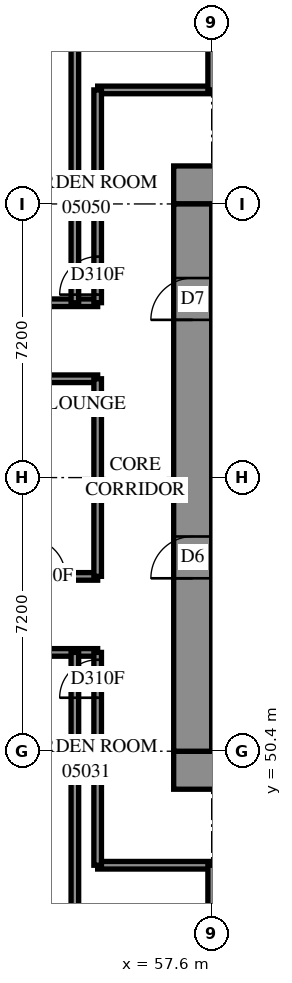
"""IFC4 building model, lengths in metres.
Left out: names, types, materials, properties, quantities, classifications, styles, units other than length and angle.
Written with IfcOpenShell. Run it as: python <this file> out.ifc"""

import sys

from ifc_helpers import new_model, si_unit, direction, frame, frame_2d, origin, place, context, subcontext, project, spatial, rectangle, extrude, element, fill, save


model = new_model("IFC4")
c1 = context("Model", 3, precision=1e-05, world=origin(), true_north=direction((0.0, 1.0)))
c2 = subcontext(c1, "Body", "Model", "MODEL_VIEW")
j1 = project(units=[si_unit("LENGTHUNIT", "METRE"), si_unit("PLANEANGLEUNIT", "RADIAN")], contexts=[c1])
p1 = place(None, origin())
s1 = spatial("IfcSite", under=j1, at=p1, CompositionType="ELEMENT")
p2 = place(p1, origin())
s2 = spatial("IfcBuilding", under=s1, at=p2, CompositionType="ELEMENT")
p3 = place(p2, frame((0.0, 0.0, 22.8)))
s3 = spatial("IfcBuildingStorey", under=s2, at=p3, CompositionType="ELEMENT", Elevation=22.8)
p4 = place(p3, frame((56.6, 49.9, -0.4), z_axis=(0.0, 0.0, 1.0), x_axis=(1.0, 0.0, 0.0)))
e1 = element("IfcWall", 1, at=p4, inside=s3, PredefinedType="SHEAR", context=c2, shape_type="SweptSolid", body=[
    extrude(rectangle(XDim=16.4, YDim=1.0, at=frame_2d((8.2, 0.0))), origin(), (0.0, 0.0, 1.0), 3.6),
])
p5 = place(p3, frame((56.6, 65.3, -0.4), z_axis=(0.0, 0.0, 1.0), x_axis=(1.0, 0.0, 0.0)))
e2 = element("IfcWall", 2, at=p5, inside=s3, PredefinedType="SHEAR", context=c2, shape_type="SweptSolid", body=[
    extrude(rectangle(XDim=16.4, YDim=1.0, at=frame_2d((8.2, 0.0))), origin(), (0.0, 0.0, 1.0), 3.6),
])
p6 = place(p5, frame((11.0, 0.0, 0.4)))
e3 = element("IfcOpeningElement", 3, at=p6, cuts=e2, PredefinedType="OPENING", context=c2, shape_type="SweptSolid", body=[
    extrude(rectangle(XDim=0.8, YDim=2.1, at=frame_2d((0.4, 1.05))), frame((0.0, 0.51, 0.0), z_axis=(0.0, -1.0, 0.0), x_axis=(1.0, 0.0, 0.0)), (0.0, 0.0, 1.0), 1.02),
])
p7 = place(p3, frame((57.1, 50.4, -0.4), z_axis=(0.0, 0.0, 1.0), x_axis=(0.0, 1.0, 0.0)))
e4 = element("IfcWall", 4, at=p7, inside=s3, PredefinedType="SHEAR", context=c2, shape_type="SweptSolid", body=[
    extrude(rectangle(XDim=14.4, YDim=1.0, at=frame_2d((7.2, 0.0))), origin(), (0.0, 0.0, 1.0), 3.6),
])
p8 = place(p7, frame((4.55, 0.0, 0.4)))
e5 = element("IfcOpeningElement", 5, at=p8, cuts=e4, PredefinedType="OPENING", context=c2, shape_type="SweptSolid", body=[
    extrude(rectangle(XDim=1.1, YDim=2.1, at=frame_2d((0.55, 1.05))), frame((0.0, 0.51, 0.0), z_axis=(0.0, -1.0, 0.0), x_axis=(1.0, 0.0, 0.0)), (0.0, 0.0, 1.0), 1.02),
])
p9 = place(p7, frame((11.35, 0.0, 0.4)))
e6 = element("IfcOpeningElement", 6, at=p9, cuts=e4, PredefinedType="OPENING", context=c2, shape_type="SweptSolid", body=[
    extrude(rectangle(XDim=1.1, YDim=2.1, at=frame_2d((0.55, 1.05))), frame((0.0, 0.51, 0.0), z_axis=(0.0, -1.0, 0.0), x_axis=(1.0, 0.0, 0.0)), (0.0, 0.0, 1.0), 1.02),
])
p10 = place(p3, frame((0.0, 55.0, 0.0), z_axis=(0.0, 0.0, 1.0), x_axis=(1.0, 0.0, 0.0)))
e7 = element("IfcWall", 7, at=p10, inside=s3, PredefinedType="PARTITIONING", context=c2, shape_type="SweptSolid", body=[
    extrude(rectangle(XDim=54.6, YDim=0.2, at=frame_2d((27.3, 0.0))), origin(), (0.0, 0.0, 1.0), 3.9),
])
p11 = place(p10, frame((8.689, 0.0, 0.0)))
e8 = element("IfcOpeningElement", 8, at=p11, cuts=e7, PredefinedType="OPENING", context=c2, shape_type="SweptSolid", body=[
    extrude(rectangle(XDim=1.0, YDim=2.1, at=frame_2d((0.5, 1.05))), frame((0.0, 0.11, 0.0), z_axis=(0.0, -1.0, 0.0), x_axis=(1.0, 0.0, 0.0)), (0.0, 0.0, 1.0), 0.22),
])
p12 = place(p10, frame((14.825, 0.0, 0.0)))
e9 = element("IfcOpeningElement", 9, at=p12, cuts=e7, PredefinedType="OPENING", context=c2, shape_type="SweptSolid", body=[
    extrude(rectangle(XDim=1.0, YDim=2.1, at=frame_2d((0.5, 1.05))), frame((0.0, 0.11, 0.0), z_axis=(0.0, -1.0, 0.0), x_axis=(1.0, 0.0, 0.0)), (0.0, 0.0, 1.0), 0.22),
])
p13 = place(p10, frame((27.284, 0.0, 0.0)))
e10 = element("IfcOpeningElement", 10, at=p13, cuts=e7, PredefinedType="OPENING", context=c2, shape_type="SweptSolid", body=[
    extrude(rectangle(XDim=1.0, YDim=2.1, at=frame_2d((0.5, 1.05))), frame((0.0, 0.11, 0.0), z_axis=(0.0, -1.0, 0.0), x_axis=(1.0, 0.0, 0.0)), (0.0, 0.0, 1.0), 0.22),
])
p14 = place(p10, frame((32.925, 0.0, 0.0)))
e11 = element("IfcOpeningElement", 11, at=p14, cuts=e7, PredefinedType="OPENING", context=c2, shape_type="SweptSolid", body=[
    extrude(rectangle(XDim=1.0, YDim=2.1, at=frame_2d((0.5, 1.05))), frame((0.0, 0.11, 0.0), z_axis=(0.0, -1.0, 0.0), x_axis=(1.0, 0.0, 0.0)), (0.0, 0.0, 1.0), 0.22),
])
p15 = place(p10, frame((38.075, 0.0, 0.0)))
e12 = element("IfcOpeningElement", 12, at=p15, cuts=e7, PredefinedType="OPENING", context=c2, shape_type="SweptSolid", body=[
    extrude(rectangle(XDim=1.0, YDim=2.1, at=frame_2d((0.5, 1.05))), frame((0.0, 0.11, 0.0), z_axis=(0.0, -1.0, 0.0), x_axis=(1.0, 0.0, 0.0)), (0.0, 0.0, 1.0), 0.22),
])
p16 = place(p10, frame((43.625, 0.0, 0.0)))
e13 = element("IfcOpeningElement", 13, at=p16, cuts=e7, PredefinedType="OPENING", context=c2, shape_type="SweptSolid", body=[
    extrude(rectangle(XDim=1.0, YDim=2.1, at=frame_2d((0.5, 1.05))), frame((0.0, 0.11, 0.0), z_axis=(0.0, -1.0, 0.0), x_axis=(1.0, 0.0, 0.0)), (0.0, 0.0, 1.0), 0.22),
])
p17 = place(p10, frame((52.752, 0.0, 0.0)))
e14 = element("IfcOpeningElement", 14, at=p17, cuts=e7, PredefinedType="OPENING", context=c2, shape_type="SweptSolid", body=[
    extrude(rectangle(XDim=1.0, YDim=2.1, at=frame_2d((0.5, 1.05))), frame((0.0, 0.11, 0.0), z_axis=(0.0, -1.0, 0.0), x_axis=(1.0, 0.0, 0.0)), (0.0, 0.0, 1.0), 0.22),
])
p18 = place(p10, frame((2.332, 0.0, 0.0)))
e15 = element("IfcOpeningElement", 15, at=p18, cuts=e7, PredefinedType="OPENING", context=c2, shape_type="SweptSolid", body=[
    extrude(rectangle(XDim=1.0, YDim=2.1, at=frame_2d((0.5, 1.05))), frame((0.0, 0.11, 0.0), z_axis=(0.0, -1.0, 0.0), x_axis=(1.0, 0.0, 0.0)), (0.0, 0.0, 1.0), 0.22),
])
p19 = place(p3, frame((0.0, 53.0, 0.0), z_axis=(0.0, 0.0, 1.0), x_axis=(1.0, 0.0, 0.0)))
e16 = element("IfcWall", 16, at=p19, inside=s3, PredefinedType="PARTITIONING", context=c2, shape_type="SweptSolid", body=[
    extrude(rectangle(XDim=54.6, YDim=0.2, at=frame_2d((27.3, 0.0))), origin(), (0.0, 0.0, 1.0), 3.9),
])
p20 = place(p19, frame((8.689, 0.0, 0.0)))
e17 = element("IfcOpeningElement", 17, at=p20, cuts=e16, PredefinedType="OPENING", context=c2, shape_type="SweptSolid", body=[
    extrude(rectangle(XDim=1.0, YDim=2.1, at=frame_2d((0.5, 1.05))), frame((0.0, 0.11, 0.0), z_axis=(0.0, -1.0, 0.0), x_axis=(1.0, 0.0, 0.0)), (0.0, 0.0, 1.0), 0.22),
])
p21 = place(p19, frame((13.174, 0.0, 0.0)))
e18 = element("IfcOpeningElement", 18, at=p21, cuts=e16, PredefinedType="OPENING", context=c2, shape_type="SweptSolid", body=[
    extrude(rectangle(XDim=1.0, YDim=2.1, at=frame_2d((0.5, 1.05))), frame((0.0, 0.11, 0.0), z_axis=(0.0, -1.0, 0.0), x_axis=(1.0, 0.0, 0.0)), (0.0, 0.0, 1.0), 0.22),
])
p22 = place(p19, frame((20.374, 0.0, 0.0)))
e19 = element("IfcOpeningElement", 19, at=p22, cuts=e16, PredefinedType="OPENING", context=c2, shape_type="SweptSolid", body=[
    extrude(rectangle(XDim=1.0, YDim=2.1, at=frame_2d((0.5, 1.05))), frame((0.0, 0.11, 0.0), z_axis=(0.0, -1.0, 0.0), x_axis=(1.0, 0.0, 0.0)), (0.0, 0.0, 1.0), 0.22),
])
p23 = place(p19, frame((27.574, 0.0, 0.0)))
e20 = element("IfcOpeningElement", 20, at=p23, cuts=e16, PredefinedType="OPENING", context=c2, shape_type="SweptSolid", body=[
    extrude(rectangle(XDim=1.0, YDim=2.1, at=frame_2d((0.5, 1.05))), frame((0.0, 0.11, 0.0), z_axis=(0.0, -1.0, 0.0), x_axis=(1.0, 0.0, 0.0)), (0.0, 0.0, 1.0), 0.22),
])
p24 = place(p19, frame((34.774, 0.0, 0.0)))
e21 = element("IfcOpeningElement", 21, at=p24, cuts=e16, PredefinedType="OPENING", context=c2, shape_type="SweptSolid", body=[
    extrude(rectangle(XDim=1.0, YDim=2.1, at=frame_2d((0.5, 1.05))), frame((0.0, 0.11, 0.0), z_axis=(0.0, -1.0, 0.0), x_axis=(1.0, 0.0, 0.0)), (0.0, 0.0, 1.0), 0.22),
])
p25 = place(p19, frame((41.974, 0.0, 0.0)))
e22 = element("IfcOpeningElement", 22, at=p25, cuts=e16, PredefinedType="OPENING", context=c2, shape_type="SweptSolid", body=[
    extrude(rectangle(XDim=1.0, YDim=2.1, at=frame_2d((0.5, 1.05))), frame((0.0, 0.11, 0.0), z_axis=(0.0, -1.0, 0.0), x_axis=(1.0, 0.0, 0.0)), (0.0, 0.0, 1.0), 0.22),
])
p26 = place(p19, frame((49.174, 0.0, 0.0)))
e23 = element("IfcOpeningElement", 23, at=p26, cuts=e16, PredefinedType="OPENING", context=c2, shape_type="SweptSolid", body=[
    extrude(rectangle(XDim=1.0, YDim=2.1, at=frame_2d((0.5, 1.05))), frame((0.0, 0.11, 0.0), z_axis=(0.0, -1.0, 0.0), x_axis=(1.0, 0.0, 0.0)), (0.0, 0.0, 1.0), 0.22),
])
p27 = place(p19, frame((2.406, 0.0, 0.0)))
e24 = element("IfcOpeningElement", 24, at=p27, cuts=e16, PredefinedType="OPENING", context=c2, shape_type="SweptSolid", body=[
    extrude(rectangle(XDim=1.0, YDim=2.1, at=frame_2d((0.5, 1.05))), frame((0.0, 0.11, 0.0), z_axis=(0.0, -1.0, 0.0), x_axis=(1.0, 0.0, 0.0)), (0.0, 0.0, 1.0), 0.22),
])
p28 = place(p19, frame((4.748, 0.0, 0.0)))
e25 = element("IfcOpeningElement", 25, at=p28, cuts=e16, PredefinedType="OPENING", context=c2, shape_type="SweptSolid", body=[
    extrude(rectangle(XDim=1.0, YDim=2.1, at=frame_2d((0.5, 1.05))), frame((0.0, 0.11, 0.0), z_axis=(0.0, -1.0, 0.0), x_axis=(1.0, 0.0, 0.0)), (0.0, 0.0, 1.0), 0.22),
])
p29 = place(p3, frame((0.002, 60.2, 0.0), z_axis=(0.0, 0.0, 1.0), x_axis=(1.0, 0.0, 0.0)))
e26 = element("IfcWall", 26, at=p29, inside=s3, PredefinedType="PARTITIONING", context=c2, shape_type="SweptSolid", body=[
    extrude(rectangle(XDim=54.598, YDim=0.2, at=frame_2d((27.299, 0.0))), origin(), (0.0, 0.0, 1.0), 3.9),
])
p30 = place(p29, frame((3.863, 0.0, 0.0)))
e27 = element("IfcOpeningElement", 27, at=p30, cuts=e26, PredefinedType="OPENING", context=c2, shape_type="SweptSolid", body=[
    extrude(rectangle(XDim=1.0, YDim=2.1, at=frame_2d((0.5, 1.05))), frame((0.0, 0.11, 0.0), z_axis=(0.0, -1.0, 0.0), x_axis=(1.0, 0.0, 0.0)), (0.0, 0.0, 1.0), 0.22),
])
p31 = place(p3, frame((0.002, 62.2, 0.0), z_axis=(0.0, 0.0, 1.0), x_axis=(1.0, 0.0, 0.0)))
e28 = element("IfcWall", 28, at=p31, inside=s3, PredefinedType="PARTITIONING", context=c2, shape_type="SweptSolid", body=[
    extrude(rectangle(XDim=54.598, YDim=0.2, at=frame_2d((27.299, 0.0))), origin(), (0.0, 0.0, 1.0), 3.9),
])
p32 = place(p31, frame((8.667, 0.0, 0.0)))
e29 = element("IfcOpeningElement", 29, at=p32, cuts=e28, PredefinedType="OPENING", context=c2, shape_type="SweptSolid", body=[
    extrude(rectangle(XDim=1.0, YDim=2.1, at=frame_2d((0.5, 1.05))), frame((0.0, 0.11, 0.0), z_axis=(0.0, -1.0, 0.0), x_axis=(1.0, 0.0, 0.0)), (0.0, 0.0, 1.0), 0.22),
])
p33 = place(p31, frame((13.136, 0.0, 0.0)))
e30 = element("IfcOpeningElement", 30, at=p33, cuts=e28, PredefinedType="OPENING", context=c2, shape_type="SweptSolid", body=[
    extrude(rectangle(XDim=1.0, YDim=2.1, at=frame_2d((0.5, 1.05))), frame((0.0, 0.11, 0.0), z_axis=(0.0, -1.0, 0.0), x_axis=(1.0, 0.0, 0.0)), (0.0, 0.0, 1.0), 0.22),
])
p34 = place(p31, frame((20.335, 0.0, 0.0)))
e31 = element("IfcOpeningElement", 31, at=p34, cuts=e28, PredefinedType="OPENING", context=c2, shape_type="SweptSolid", body=[
    extrude(rectangle(XDim=1.0, YDim=2.1, at=frame_2d((0.5, 1.05))), frame((0.0, 0.11, 0.0), z_axis=(0.0, -1.0, 0.0), x_axis=(1.0, 0.0, 0.0)), (0.0, 0.0, 1.0), 0.22),
])
p35 = place(p31, frame((27.535, 0.0, 0.0)))
e32 = element("IfcOpeningElement", 32, at=p35, cuts=e28, PredefinedType="OPENING", context=c2, shape_type="SweptSolid", body=[
    extrude(rectangle(XDim=1.0, YDim=2.1, at=frame_2d((0.5, 1.05))), frame((0.0, 0.11, 0.0), z_axis=(0.0, -1.0, 0.0), x_axis=(1.0, 0.0, 0.0)), (0.0, 0.0, 1.0), 0.22),
])
p36 = place(p31, frame((34.736, 0.0, 0.0)))
e33 = element("IfcOpeningElement", 33, at=p36, cuts=e28, PredefinedType="OPENING", context=c2, shape_type="SweptSolid", body=[
    extrude(rectangle(XDim=1.0, YDim=2.1, at=frame_2d((0.5, 1.05))), frame((0.0, 0.11, 0.0), z_axis=(0.0, -1.0, 0.0), x_axis=(1.0, 0.0, 0.0)), (0.0, 0.0, 1.0), 0.22),
])
p37 = place(p31, frame((41.935, 0.0, 0.0)))
e34 = element("IfcOpeningElement", 34, at=p37, cuts=e28, PredefinedType="OPENING", context=c2, shape_type="SweptSolid", body=[
    extrude(rectangle(XDim=1.0, YDim=2.1, at=frame_2d((0.5, 1.05))), frame((0.0, 0.11, 0.0), z_axis=(0.0, -1.0, 0.0), x_axis=(1.0, 0.0, 0.0)), (0.0, 0.0, 1.0), 0.22),
])
p38 = place(p31, frame((49.136, 0.0, 0.0)))
e35 = element("IfcOpeningElement", 35, at=p38, cuts=e28, PredefinedType="OPENING", context=c2, shape_type="SweptSolid", body=[
    extrude(rectangle(XDim=1.0, YDim=2.1, at=frame_2d((0.5, 1.05))), frame((0.0, 0.11, 0.0), z_axis=(0.0, -1.0, 0.0), x_axis=(1.0, 0.0, 0.0)), (0.0, 0.0, 1.0), 0.22),
])
p39 = place(p31, frame((4.803, 0.0, 0.0)))
e36 = element("IfcOpeningElement", 36, at=p39, cuts=e28, PredefinedType="OPENING", context=c2, shape_type="SweptSolid", body=[
    extrude(rectangle(XDim=1.0, YDim=2.1, at=frame_2d((0.5, 1.05))), frame((0.0, 0.11, 0.0), z_axis=(0.0, -1.0, 0.0), x_axis=(1.0, 0.0, 0.0)), (0.0, 0.0, 1.0), 0.22),
])
p40 = place(p3, frame((54.6, 67.8, 0.0), z_axis=(0.0, 0.0, 1.0), x_axis=(1.0, 0.0, 0.0)))
e37 = element("IfcWall", 37, at=p40, inside=s3, PredefinedType="PARTITIONING", context=c2, shape_type="SweptSolid", body=[
    extrude(rectangle(XDim=20.4, YDim=0.2, at=frame_2d((10.2, 0.0))), origin(), (0.0, 0.0, 1.0), 3.9),
])
p41 = place(p40, frame((19.271, 0.0, 0.0)))
e38 = element("IfcOpeningElement", 38, at=p41, cuts=e37, PredefinedType="OPENING", context=c2, shape_type="SweptSolid", body=[
    extrude(rectangle(XDim=1.0, YDim=2.1, at=frame_2d((0.5, 1.05))), frame((0.0, 0.11, 0.0), z_axis=(0.0, -1.0, 0.0), x_axis=(1.0, 0.0, 0.0)), (0.0, 0.0, 1.0), 0.22),
])
p42 = place(p40, frame((6.862, 0.0, 0.0)))
e39 = element("IfcOpeningElement", 39, at=p42, cuts=e37, PredefinedType="OPENING", context=c2, shape_type="SweptSolid", body=[
    extrude(rectangle(XDim=1.0, YDim=2.1, at=frame_2d((0.5, 1.05))), frame((0.0, 0.11, 0.0), z_axis=(0.0, -1.0, 0.0), x_axis=(1.0, 0.0, 0.0)), (0.0, 0.0, 1.0), 0.22),
])
p43 = place(p40, frame((14.062, 0.0, 0.0)))
e40 = element("IfcOpeningElement", 40, at=p43, cuts=e37, PredefinedType="OPENING", context=c2, shape_type="SweptSolid", body=[
    extrude(rectangle(XDim=1.0, YDim=2.1, at=frame_2d((0.5, 1.05))), frame((0.0, 0.11, 0.0), z_axis=(0.0, -1.0, 0.0), x_axis=(1.0, 0.0, 0.0)), (0.0, 0.0, 1.0), 0.22),
])
p44 = place(p3, frame((54.6, 47.4, 0.0), z_axis=(0.0, 0.0, 1.0), x_axis=(1.0, 0.0, 0.0)))
e41 = element("IfcWall", 41, at=p44, inside=s3, PredefinedType="PARTITIONING", context=c2, shape_type="SweptSolid", body=[
    extrude(rectangle(XDim=19.502, YDim=0.2, at=frame_2d((9.751, 0.0))), origin(), (0.0, 0.0, 1.0), 3.9),
])
p45 = place(p44, frame((6.886, 0.0, 0.0)))
e42 = element("IfcOpeningElement", 42, at=p45, cuts=e41, PredefinedType="OPENING", context=c2, shape_type="SweptSolid", body=[
    extrude(rectangle(XDim=1.0, YDim=2.1, at=frame_2d((0.5, 1.05))), frame((0.0, 0.11, 0.0), z_axis=(0.0, -1.0, 0.0), x_axis=(1.0, 0.0, 0.0)), (0.0, 0.0, 1.0), 0.22),
])
p46 = place(p44, frame((14.086, 0.0, 0.0)))
e43 = element("IfcOpeningElement", 43, at=p46, cuts=e41, PredefinedType="OPENING", context=c2, shape_type="SweptSolid", body=[
    extrude(rectangle(XDim=1.0, YDim=2.1, at=frame_2d((0.5, 1.05))), frame((0.0, 0.11, 0.0), z_axis=(0.0, -1.0, 0.0), x_axis=(1.0, 0.0, 0.0)), (0.0, 0.0, 1.0), 0.22),
])
for number, where, z_axis, x_axis in (
    (44, (54.0, 42.55, 0.0), (0.0, 0.0, 1.0), (0.0, 1.0, 0.0)),
    (45, (54.0, 62.2, 0.0), (0.0, 0.0, 1.0), (0.0, 1.0, 0.0)),
):
    element("IfcWall", number, at=place(p3, frame(where, z_axis=z_axis, x_axis=x_axis)), inside=s3, PredefinedType="PARTITIONING", context=c2, shape_type="SweptSolid", body=[
        extrude(rectangle(XDim=10.45, YDim=0.2, at=frame_2d((5.225, 0.0))), origin(), (0.0, 0.0, 1.0), 3.9),
    ])
p47 = place(p3, frame((54.6, 47.4, 0.0), z_axis=(0.0, 0.0, 1.0), x_axis=(0.0, 1.0, 0.0)))
e46 = element("IfcWall", 46, at=p47, inside=s3, PredefinedType="PARTITIONING", context=c2, shape_type="SweptSolid", body=[
    extrude(rectangle(XDim=5.6, YDim=0.2, at=frame_2d((2.8, 0.0))), origin(), (0.0, 0.0, 1.0), 3.9),
])
p48 = place(p47, frame((4.407, 0.0, 0.0)))
e47 = element("IfcOpeningElement", 47, at=p48, cuts=e46, PredefinedType="OPENING", context=c2, shape_type="SweptSolid", body=[
    extrude(rectangle(XDim=1.0, YDim=2.1, at=frame_2d((0.5, 1.05))), frame((0.0, 0.11, 0.0), z_axis=(0.0, -1.0, 0.0), x_axis=(1.0, 0.0, 0.0)), (0.0, 0.0, 1.0), 0.22),
])
p49 = place(p3, frame((54.6, 62.202, 0.0), z_axis=(0.0, 0.0, 1.0), x_axis=(0.0, 1.0, 0.0)))
e48 = element("IfcWall", 48, at=p49, inside=s3, PredefinedType="PARTITIONING", context=c2, shape_type="SweptSolid", body=[
    extrude(rectangle(XDim=5.598, YDim=0.2, at=frame_2d((2.799, 0.0))), origin(), (0.0, 0.0, 1.0), 3.9),
])
p50 = place(p49, frame((0.212, 0.0, 0.0)))
e49 = element("IfcOpeningElement", 49, at=p50, cuts=e48, PredefinedType="OPENING", context=c2, shape_type="SweptSolid", body=[
    extrude(rectangle(XDim=1.0, YDim=2.1, at=frame_2d((0.5, 1.05))), frame((0.0, 0.11, 0.0), z_axis=(0.0, -1.0, 0.0), x_axis=(1.0, 0.0, 0.0)), (0.0, 0.0, 1.0), 0.22),
])
p51 = place(p3, frame((54.6, 55.002, 0.0), z_axis=(0.0, 0.0, 1.0), x_axis=(0.0, 1.0, 0.0)))
e50 = element("IfcWall", 50, at=p51, inside=s3, PredefinedType="PARTITIONING", context=c2, shape_type="SweptSolid", body=[
    extrude(rectangle(XDim=5.198, YDim=0.2, at=frame_2d((2.599, 0.0))), origin(), (0.0, 0.0, 1.0), 3.9),
])
for number, where, z_axis, x_axis in (
    (51, (57.6, 67.8, 0.0), (0.0, 0.0, 1.0), (0.0, 1.0, 0.0)),
    (52, (57.6, 43.8, 0.0), (0.0, 0.0, 1.0), (0.0, 1.0, 0.0)),
):
    element("IfcWall", number, at=place(p3, frame(where, z_axis=z_axis, x_axis=x_axis)), inside=s3, PredefinedType="PARTITIONING", context=c2, shape_type="SweptSolid", body=[
        extrude(rectangle(XDim=3.6, YDim=0.2, at=frame_2d((1.8, 0.0))), origin(), (0.0, 0.0, 1.0), 3.9),
    ])
p52 = place(p8, origin())
e53 = element("IfcDoor", 53, at=p52, inside=s3, OperationType="DOUBLE_DOOR_SINGLE_SWING", PredefinedType="DOOR", context=c2, shape_type="SweptSolid", body=[
    extrude(rectangle(XDim=1.1, YDim=2.1, at=frame_2d((0.55, 1.05))), frame((0.0, 0.025, 0.0), z_axis=(0.0, -1.0, 0.0), x_axis=(1.0, 0.0, 0.0)), (0.0, 0.0, 1.0), 0.05),
])
fill(e5, e53)
p53 = place(p9, origin())
e54 = element("IfcDoor", 54, at=p53, inside=s3, OperationType="SINGLE_SWING_LEFT", PredefinedType="DOOR", context=c2, shape_type="SweptSolid", body=[
    extrude(rectangle(XDim=1.1, YDim=2.1, at=frame_2d((0.55, 1.05))), frame((0.0, 0.025, 0.0), z_axis=(0.0, -1.0, 0.0), x_axis=(1.0, 0.0, 0.0)), (0.0, 0.0, 1.0), 0.05),
])
fill(e6, e54)
p54 = place(p48, origin())
e55 = element("IfcDoor", 55, at=p54, inside=s3, OperationType="SINGLE_SWING_RIGHT", PredefinedType="DOOR", context=c2, shape_type="SweptSolid", body=[
    extrude(rectangle(XDim=1.0, YDim=2.1, at=frame_2d((0.5, 1.05))), frame((0.0, 0.025, 0.0), z_axis=(0.0, -1.0, 0.0), x_axis=(1.0, 0.0, 0.0)), (0.0, 0.0, 1.0), 0.05),
])
fill(e47, e55)
p55 = place(p17, origin())
e56 = element("IfcDoor", 56, at=p55, inside=s3, OperationType="SINGLE_SWING_RIGHT", PredefinedType="DOOR", context=c2, shape_type="SweptSolid", body=[
    extrude(rectangle(XDim=1.0, YDim=2.1, at=frame_2d((0.5, 1.05))), frame((0.0, 0.025, 0.0), z_axis=(0.0, -1.0, 0.0), x_axis=(1.0, 0.0, 0.0)), (0.0, 0.0, 1.0), 0.05),
])
fill(e14, e56)
p56 = place(p50, origin())
e57 = element("IfcDoor", 57, at=p56, inside=s3, OperationType="SINGLE_SWING_LEFT", PredefinedType="DOOR", context=c2, shape_type="SweptSolid", body=[
    extrude(rectangle(XDim=1.0, YDim=2.1, at=frame_2d((0.5, 1.05))), frame((0.0, 0.025, 0.0), z_axis=(0.0, -1.0, 0.0), x_axis=(1.0, 0.0, 0.0)), (0.0, 0.0, 1.0), 0.05),
])
fill(e49, e57)
save(model, sys.argv[1])
